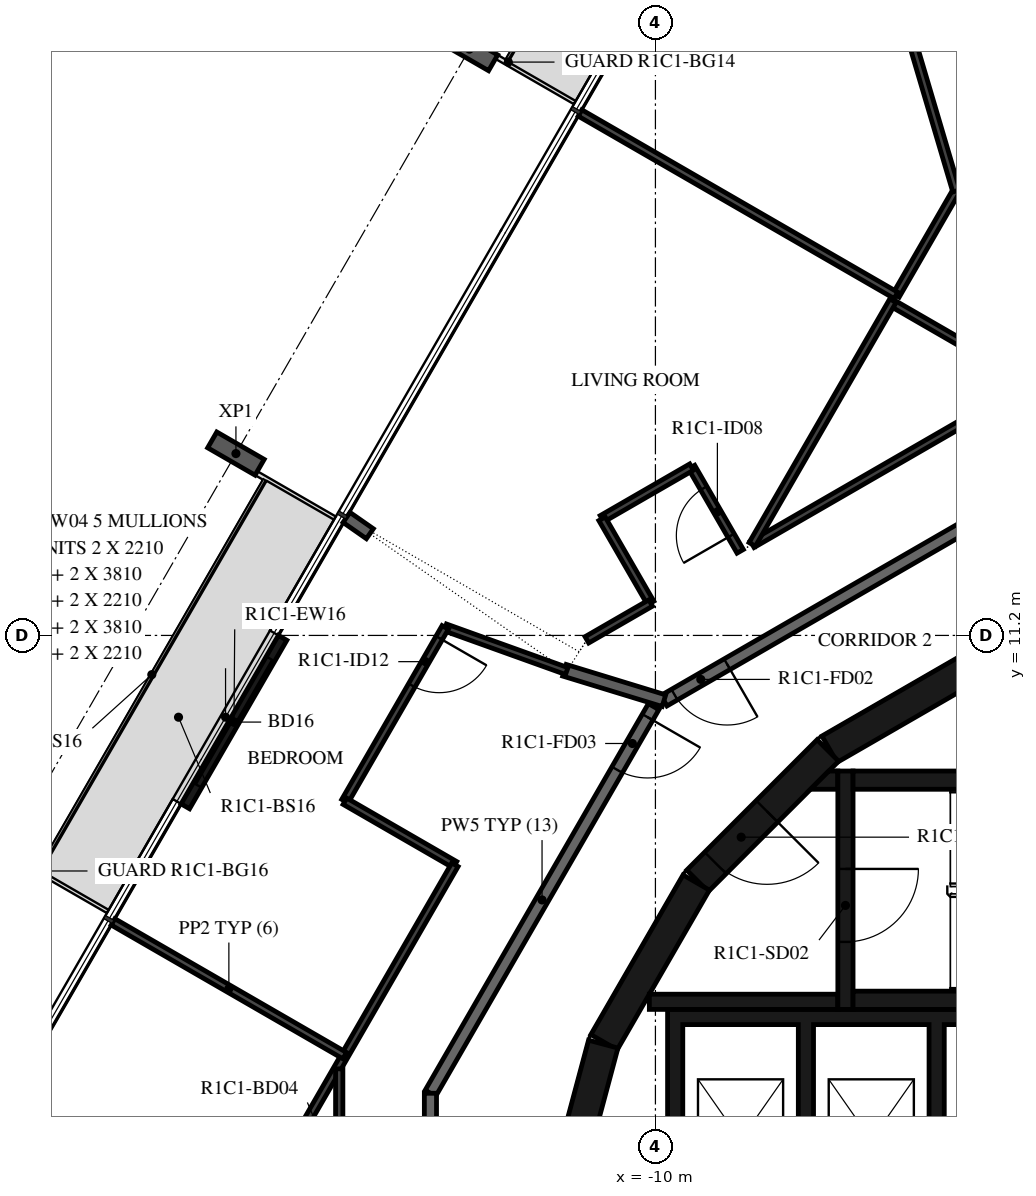
"""IFC4 building model, lengths in metres.
Left out: names, types, materials, properties, quantities, classifications, styles, units other than length and angle.
Written with IfcOpenShell. Run it as: python <this file> out.ifc"""

import sys

from ifc_helpers import new_model, si_unit, direction, frame, frame_2d, origin, origin_2d, place, context, subcontext, project, spatial, polyline, rectangle, i_section, outline, extrude, element, fill, save


model = new_model("IFC4")
c1 = context("Model", 3, precision=1e-05, world=origin(), true_north=direction((0.0, 1.0)))
c2 = subcontext(c1, "Body", "Model", "MODEL_VIEW")
j1 = project(units=[si_unit("LENGTHUNIT", "METRE"), si_unit("PLANEANGLEUNIT", "RADIAN")], contexts=[c1])
p1 = place(None, origin())
s1 = spatial("IfcSite", under=j1, at=p1, CompositionType="ELEMENT")
p2 = place(p1, origin())
s2 = spatial("IfcBuilding", under=s1, at=p2, CompositionType="ELEMENT")
p3 = place(p2, frame((0.0, 0.0, 62.9)))
s3 = spatial("IfcBuildingStorey", under=s2, at=p3, CompositionType="ELEMENT", Elevation=62.9)
for number, where, z_axis, x_axis in (
    (1, (-13.059, 20.842, -0.38), (0.0, 0.0, 1.0), (0.5, 0.866, 0.0)),
    (2, (-16.899, 14.19, -0.38), (0.0, 0.0, 1.0), (0.5, 0.866, 0.0)),
):
    element("IfcColumn", number, at=place(p3, frame(where, z_axis=z_axis, x_axis=x_axis)), inside=s3, PredefinedType="COLUMN", context=c2, shape_type="SweptSolid", body=[
        extrude(i_section(OverallWidth=0.3, OverallDepth=0.9, WebThickness=0.019, FlangeThickness=0.035, FilletRadius=0.03, at=origin_2d()), origin(), (0.0, 0.0, 1.0), 3.5),
    ])
p4 = place(p3, frame((-16.131, 11.161, 0.0), z_axis=(0.0, 0.0, 1.0), x_axis=(-0.500028443584, -0.866008981251, 0.0)))
e3 = element("IfcWall", 3, at=p4, inside=s3, PredefinedType="STANDARD", context=c2, shape_type="SweptSolid", body=[
    extrude(rectangle(XDim=3.2, YDim=0.16, at=frame_2d((1.6, 0.0))), origin(), (0.0, 0.0, 1.0), 3.12),
])
p5 = place(p4, frame((0.4, 0.0, 0.0)))
e4 = element("IfcOpeningElement", 4, at=p5, cuts=e3, PredefinedType="OPENING", context=c2, shape_type="SweptSolid", body=[
    extrude(rectangle(XDim=2.4, YDim=2.4, at=frame_2d((1.2, 1.2))), frame((0.0, 0.09, 0.0), z_axis=(0.0, -1.0, 0.0), x_axis=(1.0, 0.0, 0.0)), (0.0, 0.0, 1.0), 0.18),
])
p6 = place(p3, frame((-4.51, 10.845, 0.0), z_axis=(0.0, 0.0, 1.0), x_axis=(-0.865975092491, -0.500087131594, 0.0)))
e5 = element("IfcWall", 5, at=p6, inside=s3, PredefinedType="SHEAR", context=c2, shape_type="SweptSolid", body=[
    extrude(rectangle(XDim=3.033, YDim=0.5, at=frame_2d((1.516, 0.0))), origin(), (0.0, 0.0, 1.0), 3.12),
])
p7 = place(p3, frame((-7.164, 9.308, 0.0), z_axis=(0.0, 0.0, 1.0), x_axis=(-0.707106781187, -0.707106781187, 0.0)))
e6 = element("IfcWall", 6, at=p7, inside=s3, PredefinedType="SHEAR", context=c2, shape_type="SweptSolid", body=[
    extrude(rectangle(XDim=3.032, YDim=0.5, at=frame_2d((1.516, 0.0))), origin(), (0.0, 0.0, 1.0), 3.12),
])
p8 = place(p7, frame((1.416, 0.0, 0.0)))
e7 = element("IfcOpeningElement", 7, at=p8, cuts=e6, PredefinedType="OPENING", context=c2, shape_type="SweptSolid", body=[
    extrude(rectangle(XDim=1.2, YDim=2.1, at=frame_2d((0.6, 1.05))), frame((0.0, 0.26, 0.0), z_axis=(0.0, -1.0, 0.0), x_axis=(1.0, 0.0, 0.0)), (0.0, 0.0, 1.0), 0.52),
])
for number, where, z_axis, x_axis in (
    (8, (-9.329, 7.137, 0.0), (0.0, 0.0, 1.0), (-0.5, -0.866, 0.0)),
    (9, (-10.858, 4.479, 0.0), (0.0, 0.0, 1.0), (-0.259, -0.966, 0.0)),
):
    element("IfcWall", number, at=place(p3, frame(where, z_axis=z_axis, x_axis=x_axis)), inside=s3, PredefinedType="SHEAR", context=c2, shape_type="SweptSolid", body=[
        extrude(rectangle(XDim=3.033, YDim=0.5, at=frame_2d((1.516, 0.0))), origin(), (0.0, 0.0, 1.0), 3.12),
    ])
for number, where, z_axis, x_axis in (
    (10, (-6.75, 5.2, 0.0), (0.0, 0.0, 1.0), (1.0, 0.0, 0.0)),
    (11, (-6.75, 8.82, 0.0), (0.0, 0.0, 1.0), (1.0, 0.0, 0.0)),
):
    element("IfcWall", number, at=place(p3, frame(where, z_axis=z_axis, x_axis=x_axis)), inside=s3, PredefinedType="SHEAR", context=c2, shape_type="SweptSolid", body=[
        extrude(rectangle(XDim=6.75, YDim=0.3, at=frame_2d((3.375, 0.0))), origin(), (0.0, 0.0, 1.0), 3.12),
    ])
p9 = place(p3, frame((-6.875, 8.97, 0.0), z_axis=(0.0, 0.0, 1.0), x_axis=(0.0, -1.0, 0.0)))
e12 = element("IfcWall", 12, at=p9, inside=s3, PredefinedType="SHEAR", context=c2, shape_type="SweptSolid", body=[
    extrude(rectangle(XDim=3.92, YDim=0.25, at=frame_2d((1.96, 0.0))), origin(), (0.0, 0.0, 1.0), 3.12),
])
p10 = place(p9, frame((1.61, 0.0, 0.0)))
e13 = element("IfcOpeningElement", 13, at=p10, cuts=e12, PredefinedType="OPENING", context=c2, shape_type="SweptSolid", body=[
    extrude(rectangle(XDim=1.2, YDim=2.1, at=frame_2d((0.6, 1.05))), frame((0.0, 0.135, 0.0), z_axis=(0.0, -1.0, 0.0), x_axis=(1.0, 0.0, 0.0)), (0.0, 0.0, 1.0), 0.27),
])
p11 = place(p3, frame((-7.0, 5.175, 0.0), z_axis=(0.0, 0.0, 1.0), x_axis=(-1.0, 0.0, 0.0)))
e14 = element("IfcWall", 14, at=p11, inside=s3, PredefinedType="SHEAR", context=c2, shape_type="SweptSolid", body=[
    extrude(rectangle(XDim=3.1, YDim=0.25, at=frame_2d((1.55, 0.0))), origin(), (0.0, 0.0, 1.0), 3.12),
])
p12 = place(p3, origin())
e15 = element("IfcWall", 15, at=p12, inside=s3, PredefinedType="SHEAR", context=c2, shape_type="SweptSolid", body=[
    extrude(outline(polyline([(-7.148, 8.97), (-7.0, 8.97), (-7.0, 8.67), (-7.448, 8.67), (-7.148, 8.97)])), origin(), (0.0, 0.0, 1.0), 3.12),
])
p13 = place(p3, origin())
e16 = element("IfcWall", 16, at=p13, inside=s3, PredefinedType="SHEAR", context=c2, shape_type="SweptSolid", body=[
    extrude(outline(polyline([(-9.55, 4.8), (-7.65, 4.8), (-7.65, 1.9), (-7.4, 1.9), (-7.4, 4.8), (-5.5, 4.8), (-5.5, 1.9), (-5.25, 1.9), (-5.25, 4.8), (-3.35, 4.8), (-3.35, 1.9), (-3.1, 1.9), (-3.1, 4.8), (-1.2, 4.8), (-1.2, 1.9), (-0.95, 1.9), (-0.95, 4.8), (3.1, 4.8), (3.1, 1.9), (3.35, 1.9), (3.35, 4.8), (5.25, 4.8), (5.25, 1.9), (5.5, 1.9), (5.5, 4.8), (7.4, 4.8), (7.4, 1.9), (7.65, 1.9), (7.65, 4.8), (9.55, 4.8), (9.55, 1.9), (9.8, 1.9), (9.8, 4.8), (9.8, 5.05), (-9.8, 5.05), (-9.8, 4.8), (-9.8, 1.9), (-9.55, 1.9), (-9.55, 4.8)])), origin(), (0.0, 0.0, 1.0), 3.12),
])
p14 = place(p3, frame((-3.671, 13.7, 0.0), z_axis=(0.0, 0.0, 1.0), x_axis=(-0.866031419417, -0.499989580474, 0.0)))
e17 = element("IfcWall", 17, at=p14, inside=s3, PredefinedType="STANDARD", context=c2, shape_type="SweptSolid", body=[
    extrude(rectangle(XDim=7.147, YDim=0.2, at=frame_2d((3.573, 0.0))), origin(), (0.0, 0.0, 1.0), 3.12),
])
p15 = place(p14, frame((5.947, 0.0, 0.0)))
e18 = element("IfcOpeningElement", 18, at=p15, cuts=e17, PredefinedType="OPENING", context=c2, shape_type="SweptSolid", body=[
    extrude(rectangle(XDim=1.0, YDim=2.1, at=frame_2d((0.5, 1.05))), frame((0.0, 0.11, 0.0), z_axis=(0.0, -1.0, 0.0), x_axis=(1.0, 0.0, 0.0)), (0.0, 0.0, 1.0), 0.22),
])
p16 = place(p3, frame((-10.029, 10.029, 0.0), z_axis=(0.0, 0.0, 1.0), x_axis=(-0.500001669485, -0.866024439905, 0.0)))
e19 = element("IfcWall", 19, at=p16, inside=s3, PredefinedType="STANDARD", context=c2, shape_type="SweptSolid", body=[
    extrude(rectangle(XDim=7.342, YDim=0.2, at=frame_2d((3.671, 0.0))), origin(), (0.0, 0.0, 1.0), 3.12),
])
p17 = place(p16, frame((0.2, 0.0, 0.0)))
e20 = element("IfcOpeningElement", 20, at=p17, cuts=e19, PredefinedType="OPENING", context=c2, shape_type="SweptSolid", body=[
    extrude(rectangle(XDim=1.0, YDim=2.1, at=frame_2d((0.5, 1.05))), frame((0.0, 0.11, 0.0), z_axis=(0.0, -1.0, 0.0), x_axis=(1.0, 0.0, 0.0)), (0.0, 0.0, 1.0), 0.22),
])
p18 = place(p3, frame((-13.7, 3.671, 0.0), z_axis=(0.0, 0.0, 1.0), x_axis=(0.0, -1.0, 0.0)))
e21 = element("IfcWall", 21, at=p18, inside=s3, PredefinedType="STANDARD", context=c2, shape_type="SweptSolid", body=[
    extrude(rectangle(XDim=7.342, YDim=0.2, at=frame_2d((3.671, 0.0))), origin(), (0.0, 0.0, 1.0), 3.12),
])
p19 = place(p3, frame((-11.496, 10.627, 0.0), z_axis=(0.0, 0.0, 1.0), x_axis=(0.956240708563, -0.292581112321, 0.0)))
e22 = element("IfcWall", 22, at=p19, inside=s3, PredefinedType="STANDARD", context=c2, shape_type="SweptSolid", body=[
    extrude(rectangle(XDim=1.711, YDim=0.2, at=frame_2d((0.855, 0.0))), origin(), (0.0, 0.0, 1.0), 3.12),
])
p20 = place(p3, frame((-15.08, 13.14, 0.0), z_axis=(0.0, 0.0, 1.0), x_axis=(0.820309143391, -0.571920369692, 0.0)))
e23 = element("IfcWall", 23, at=p20, inside=s3, PredefinedType="STANDARD", context=c2, shape_type="SweptSolid", body=[
    extrude(rectangle(XDim=0.468, YDim=0.2, at=frame_2d((0.234, 0.0))), origin(), (0.0, 0.0, 1.0), 3.12),
])
p21 = place(p3, frame((-4.073, 15.2, 0.0), z_axis=(0.0, 0.0, 1.0), x_axis=(-0.866034514313, -0.499984219769, 0.0)))
e24 = element("IfcWall", 24, at=p21, inside=s3, PredefinedType="PARTITIONING", context=c2, shape_type="SweptSolid", body=[
    extrude(rectangle(XDim=5.006, YDim=0.12, at=frame_2d((2.503, 0.0))), origin(), (0.0, 0.0, 1.0), 3.12),
])
p22 = place(p21, frame((0.2, 0.0, 0.0)))
e25 = element("IfcOpeningElement", 25, at=p22, cuts=e24, PredefinedType="OPENING", context=c2, shape_type="SweptSolid", body=[
    extrude(rectangle(XDim=0.8, YDim=2.1, at=frame_2d((0.4, 1.05))), frame((0.0, 0.07, 0.0), z_axis=(0.0, -1.0, 0.0), x_axis=(1.0, 0.0, 0.0)), (0.0, 0.0, 1.0), 0.14),
])
p23 = place(p3, frame((-8.606, 12.583, 0.0), z_axis=(0.0, 0.0, 1.0), x_axis=(-0.499995408039, 0.866028054938, 0.0)))
e26 = element("IfcWall", 26, at=p23, inside=s3, PredefinedType="PARTITIONING", context=c2, shape_type="SweptSolid", body=[
    extrude(rectangle(XDim=1.6, YDim=0.12, at=frame_2d((0.8, 0.0))), origin(), (0.0, 0.0, 1.0), 3.12),
])
p24 = place(p23, frame((0.3, 0.0, 0.0)))
e27 = element("IfcOpeningElement", 27, at=p24, cuts=e26, PredefinedType="OPENING", context=c2, shape_type="SweptSolid", body=[
    extrude(rectangle(XDim=0.9, YDim=2.1, at=frame_2d((0.45, 1.05))), frame((0.0, 0.07, 0.0), z_axis=(0.0, -1.0, 0.0), x_axis=(1.0, 0.0, 0.0)), (0.0, 0.0, 1.0), 0.14),
])
p25 = place(p3, frame((-9.406, 13.969, 0.0), z_axis=(0.0, 0.0, 1.0), x_axis=(-0.865989465428, -0.500062241894, 0.0)))
e28 = element("IfcWall", 28, at=p25, inside=s3, PredefinedType="PARTITIONING", context=c2, shape_type="SweptSolid", body=[
    extrude(rectangle(XDim=1.7, YDim=0.12, at=frame_2d((0.85, 0.0))), origin(), (0.0, 0.0, 1.0), 3.12),
])
p26 = place(p3, frame((-10.878, 13.118, 0.0), z_axis=(0.0, 0.0, 1.0), x_axis=(0.500061482766, -0.865989903783, 0.0)))
e29 = element("IfcWall", 29, at=p26, inside=s3, PredefinedType="PARTITIONING", context=c2, shape_type="SweptSolid", body=[
    extrude(rectangle(XDim=1.6, YDim=0.12, at=frame_2d((0.8, 0.0))), origin(), (0.0, 0.0, 1.0), 3.12),
])
p27 = place(p3, frame((-10.078, 11.733, 0.0), z_axis=(0.0, 0.0, 1.0), x_axis=(-0.866014416983, -0.500019029215, 0.0)))
e30 = element("IfcWall", 30, at=p27, inside=s3, PredefinedType="PARTITIONING", context=c2, shape_type="SweptSolid", body=[
    extrude(rectangle(XDim=1.211, YDim=0.12, at=frame_2d((0.606, 0.0))), origin(), (0.0, 0.0, 1.0), 3.12),
])
p28 = place(p3, frame((-1.907, 23.957, 0.0), z_axis=(0.0, 0.0, 1.0), x_axis=(-0.499994901178, -0.866028347571, 0.0)))
e31 = element("IfcWall", 31, at=p28, inside=s3, PredefinedType="PARTITIONING", context=c2, shape_type="SweptSolid", body=[
    extrude(rectangle(XDim=8.274, YDim=0.12, at=frame_2d((4.137, 0.0))), origin(), (0.0, 0.0, 1.0), 3.12),
])
p29 = place(p28, frame((4.387, 0.0, 0.0)))
e32 = element("IfcOpeningElement", 32, at=p29, cuts=e31, PredefinedType="OPENING", context=c2, shape_type="SweptSolid", body=[
    extrude(rectangle(XDim=0.9, YDim=2.1, at=frame_2d((0.45, 1.05))), frame((0.0, 0.07, 0.0), z_axis=(0.0, -1.0, 0.0), x_axis=(1.0, 0.0, 0.0)), (0.0, 0.0, 1.0), 0.14),
])
p30 = place(p3, frame((-6.114, 16.67, 0.0), z_axis=(0.0, 0.0, 1.0), x_axis=(0.866011328839, -0.500024377727, 0.0)))
e33 = element("IfcWall", 33, at=p30, inside=s3, PredefinedType="PARTITIONING", context=c2, shape_type="SweptSolid", body=[
    extrude(rectangle(XDim=2.94, YDim=0.12, at=frame_2d((1.47, 0.0))), origin(), (0.0, 0.0, 1.0), 3.12),
])
p31 = place(p3, frame((-7.4, 26.443, 0.0), z_axis=(0.0, 0.0, 1.0), x_axis=(0.283777867447, -0.95889004685, 0.0)))
e34 = element("IfcWall", 34, at=p31, inside=s3, PredefinedType="PARTITIONING", context=c2, shape_type="SweptSolid", body=[
    extrude(rectangle(XDim=8.274, YDim=0.12, at=frame_2d((4.137, 0.0))), origin(), (0.0, 0.0, 1.0), 3.12),
])
p32 = place(p31, frame((0.8, 0.0, 0.0)))
e35 = element("IfcOpeningElement", 35, at=p32, cuts=e34, PredefinedType="OPENING", context=c2, shape_type="SweptSolid", body=[
    extrude(rectangle(XDim=0.9, YDim=2.1, at=frame_2d((0.45, 1.05))), frame((0.0, 0.07, 0.0), z_axis=(0.0, -1.0, 0.0), x_axis=(1.0, 0.0, 0.0)), (0.0, 0.0, 1.0), 0.14),
])
p33 = place(p3, frame((-11.24, 19.792, 0.0), z_axis=(0.0, 0.0, 1.0), x_axis=(0.866031096941, -0.499990139034, 0.0)))
e36 = element("IfcWall", 36, at=p33, inside=s3, PredefinedType="PARTITIONING", context=c2, shape_type="SweptSolid", body=[
    extrude(rectangle(XDim=6.0, YDim=0.12, at=frame_2d((3.0, 0.0))), origin(), (0.0, 0.0, 1.0), 2.73),
])
p34 = place(p3, frame((-6.094, 16.705, 0.0), z_axis=(0.0, 0.0, 1.0), x_axis=(-0.500014747178, -0.86601688933, 0.0)))
e37 = element("IfcWall", 37, at=p34, inside=s3, PredefinedType="PARTITIONING", context=c2, shape_type="SweptSolid", body=[
    extrude(rectangle(XDim=4.627, YDim=0.12, at=frame_2d((2.313, 0.0))), origin(), (0.0, 0.0, 1.0), 3.12),
])
p35 = place(p3, frame((-11.458, 10.614, 0.0), z_axis=(0.0, 0.0, 1.0), x_axis=(-0.941092440198, 0.338149403375, 0.0)))
e38 = element("IfcWall", 38, at=p35, inside=s3, PredefinedType="PARTITIONING", context=c2, shape_type="SweptSolid", body=[
    extrude(rectangle(XDim=2.123, YDim=0.12, at=frame_2d((1.062, 0.0))), origin(), (0.0, 0.0, 1.0), 3.12),
])
p36 = place(p3, frame((-13.457, 11.332, 0.0), z_axis=(0.0, 0.0, 1.0), x_axis=(-0.499974350878, -0.866040211805, 0.0)))
e39 = element("IfcWall", 39, at=p36, inside=s3, PredefinedType="PARTITIONING", context=c2, shape_type="SweptSolid", body=[
    extrude(rectangle(XDim=3.3, YDim=0.12, at=frame_2d((1.65, 0.0))), origin(), (0.0, 0.0, 1.0), 3.12),
])
p37 = place(p36, frame((0.2, 0.0, 0.0)))
e40 = element("IfcOpeningElement", 40, at=p37, cuts=e39, PredefinedType="OPENING", context=c2, shape_type="SweptSolid", body=[
    extrude(rectangle(XDim=0.9, YDim=2.1, at=frame_2d((0.45, 1.05))), frame((0.0, 0.07, 0.0), z_axis=(0.0, -1.0, 0.0), x_axis=(1.0, 0.0, 0.0)), (0.0, 0.0, 1.0), 0.14),
])
p38 = place(p3, frame((-15.106, 8.474, 0.0), z_axis=(0.0, 0.0, 1.0), x_axis=(0.866041603473, -0.499971940267, 0.0)))
e41 = element("IfcWall", 41, at=p38, inside=s3, PredefinedType="PARTITIONING", context=c2, shape_type="SweptSolid", body=[
    extrude(rectangle(XDim=2.089, YDim=0.12, at=frame_2d((1.045, 0.0))), origin(), (0.0, 0.0, 1.0), 3.12),
])
p39 = place(p3, frame((-13.297, 7.429, 0.0), z_axis=(0.0, 0.0, 1.0), x_axis=(-0.49999903102, -0.866025963225, 0.0)))
e42 = element("IfcWall", 42, at=p39, inside=s3, PredefinedType="PARTITIONING", context=c2, shape_type="SweptSolid", body=[
    extrude(rectangle(XDim=7.667, YDim=0.12, at=frame_2d((3.833, 0.0))), origin(), (0.0, 0.0, 1.0), 3.12),
])
p40 = place(p3, frame((-15.2, 4.073, 0.0), z_axis=(0.0, 0.0, 1.0), x_axis=(0.0, -1.0, 0.0)))
e43 = element("IfcWall", 43, at=p40, inside=s3, PredefinedType="PARTITIONING", context=c2, shape_type="SweptSolid", body=[
    extrude(rectangle(XDim=4.398, YDim=0.12, at=frame_2d((2.199, 0.0))), origin(), (0.0, 0.0, 1.0), 3.12),
])
p41 = place(p40, frame((1.4, 0.0, 0.0)))
e44 = element("IfcOpeningElement", 44, at=p41, cuts=e43, PredefinedType="OPENING", context=c2, shape_type="SweptSolid", body=[
    extrude(rectangle(XDim=0.8, YDim=2.1, at=frame_2d((0.4, 1.05))), frame((0.0, 0.07, 0.0), z_axis=(0.0, -1.0, 0.0), x_axis=(1.0, 0.0, 0.0)), (0.0, 0.0, 1.0), 0.14),
])
p42 = place(p3, frame((-18.92, 6.49, 0.0), z_axis=(0.0, 0.0, 1.0), x_axis=(0.865994303029, -0.500053864221, 0.0)))
e45 = element("IfcWall", 45, at=p42, inside=s3, PredefinedType="PARTITIONING", context=c2, shape_type="SweptSolid", body=[
    extrude(rectangle(XDim=4.4, YDim=0.12, at=frame_2d((2.2, 0.0))), origin(), (0.0, 0.0, 1.0), 2.73),
])
p43 = place(p5, origin())
e46 = element("IfcDoor", 46, at=p43, inside=s3, OperationType="DOUBLE_DOOR_SLIDING", PredefinedType="DOOR", context=c2, shape_type="SweptSolid", body=[
    extrude(rectangle(XDim=2.4, YDim=2.4, at=frame_2d((1.2, 1.2))), frame((0.0, 0.025, 0.0), z_axis=(0.0, -1.0, 0.0), x_axis=(1.0, 0.0, 0.0)), (0.0, 0.0, 1.0), 0.05),
])
fill(e4, e46)
p44 = place(p10, origin())
e47 = element("IfcDoor", 47, at=p44, inside=s3, OperationType="SINGLE_SWING_LEFT", PredefinedType="DOOR", context=c2, shape_type="SweptSolid", body=[
    extrude(rectangle(XDim=1.2, YDim=2.1, at=frame_2d((0.6, 1.05))), frame((0.0, 0.025, 0.0), z_axis=(0.0, -1.0, 0.0), x_axis=(1.0, 0.0, 0.0)), (0.0, 0.0, 1.0), 0.05),
])
fill(e13, e47)
p45 = place(p8, origin())
e48 = element("IfcDoor", 48, at=p45, inside=s3, OperationType="SINGLE_SWING_RIGHT", PredefinedType="DOOR", context=c2, shape_type="SweptSolid", body=[
    extrude(rectangle(XDim=1.2, YDim=2.1, at=frame_2d((0.6, 1.05))), frame((0.0, 0.025, 0.0), z_axis=(0.0, -1.0, 0.0), x_axis=(1.0, 0.0, 0.0)), (0.0, 0.0, 1.0), 0.05),
])
fill(e7, e48)
p46 = place(p15, origin())
e49 = element("IfcDoor", 49, at=p46, inside=s3, OperationType="SINGLE_SWING_LEFT", PredefinedType="DOOR", context=c2, shape_type="SweptSolid", body=[
    extrude(rectangle(XDim=1.0, YDim=2.1, at=frame_2d((0.5, 1.05))), frame((0.0, 0.025, 0.0), z_axis=(0.0, -1.0, 0.0), x_axis=(1.0, 0.0, 0.0)), (0.0, 0.0, 1.0), 0.05),
])
fill(e18, e49)
p47 = place(p24, origin())
e50 = element("IfcDoor", 50, at=p47, inside=s3, OperationType="SINGLE_SWING_RIGHT", PredefinedType="DOOR", context=c2, shape_type="SweptSolid", body=[
    extrude(rectangle(XDim=0.9, YDim=2.1, at=frame_2d((0.45, 1.05))), frame((0.0, 0.025, 0.0), z_axis=(0.0, -1.0, 0.0), x_axis=(1.0, 0.0, 0.0)), (0.0, 0.0, 1.0), 0.05),
])
fill(e27, e50)
p48 = place(p17, origin())
e51 = element("IfcDoor", 51, at=p48, inside=s3, OperationType="SINGLE_SWING_LEFT", PredefinedType="DOOR", context=c2, shape_type="SweptSolid", body=[
    extrude(rectangle(XDim=1.0, YDim=2.1, at=frame_2d((0.5, 1.05))), frame((0.0, 0.025, 0.0), z_axis=(0.0, -1.0, 0.0), x_axis=(1.0, 0.0, 0.0)), (0.0, 0.0, 1.0), 0.05),
])
fill(e20, e51)
p49 = place(p37, origin())
e52 = element("IfcDoor", 52, at=p49, inside=s3, OperationType="SINGLE_SWING_LEFT", PredefinedType="DOOR", context=c2, shape_type="SweptSolid", body=[
    extrude(rectangle(XDim=0.9, YDim=2.1, at=frame_2d((0.45, 1.05))), frame((0.0, 0.025, 0.0), z_axis=(0.0, -1.0, 0.0), x_axis=(1.0, 0.0, 0.0)), (0.0, 0.0, 1.0), 0.05),
])
fill(e40, e52)
save(model, sys.argv[1])
